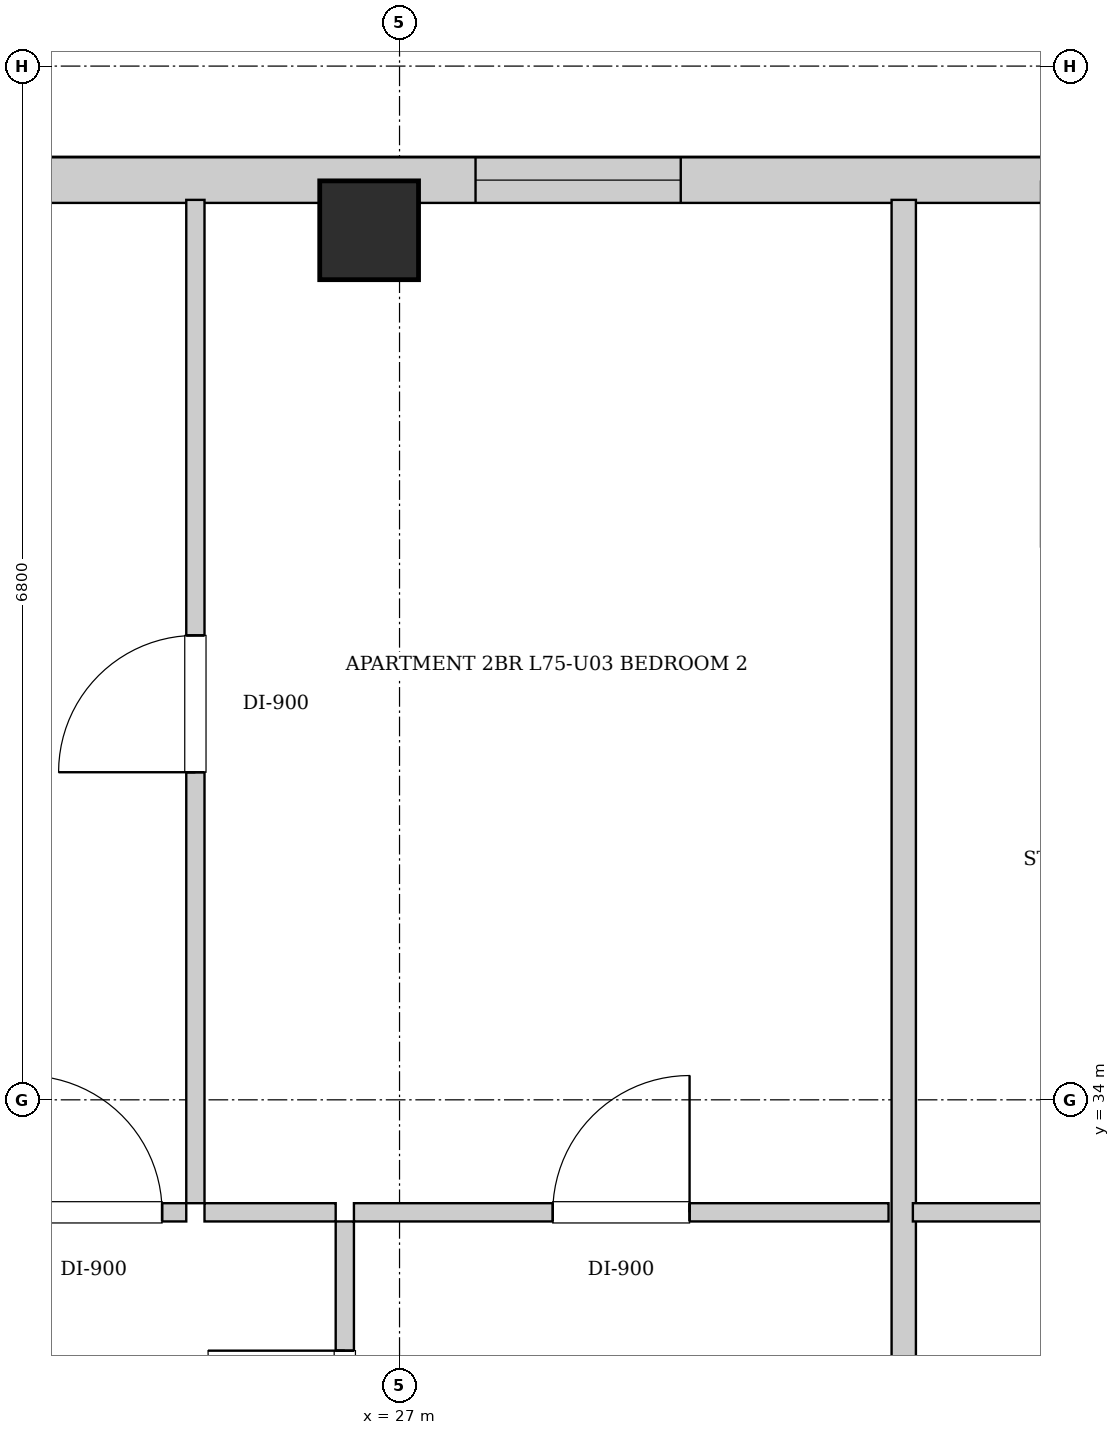
"""IFC4 building model, lengths in metres.
Left out: names, types, materials, properties, quantities, classifications, styles, units other than length and angle.
Written with IfcOpenShell. Run it as: python <this file> out.ifc"""

import sys

from ifc_helpers import new_model, si_unit, direction, frame, frame_2d, origin, origin_2d, place, context, subcontext, project, spatial, rectangle, extrude, element, fill, save


model = new_model("IFC4")
c1 = context("Model", 3, precision=1e-05, world=origin(), true_north=direction((0.0, 1.0)))
c2 = subcontext(c1, "Body", "Model", "MODEL_VIEW")
j1 = project(units=[si_unit("LENGTHUNIT", "METRE"), si_unit("PLANEANGLEUNIT", "RADIAN")], contexts=[c1])
p1 = place(None, origin())
s1 = spatial("IfcSite", under=j1, at=p1, CompositionType="ELEMENT")
p2 = place(p1, origin())
s2 = spatial("IfcBuilding", under=s1, at=p2, CompositionType="ELEMENT")
p3 = place(p2, frame((0.0, 0.0, 258.1)))
s3 = spatial("IfcBuildingStorey", under=s2, at=p3, CompositionType="ELEMENT", Elevation=258.1)
p4 = place(p3, frame((26.8, 39.72, 0.0), z_axis=(0.0, 0.0, 1.0), x_axis=(1.0, 0.0, 0.0)))
e1 = element("IfcColumn", 1, at=p4, inside=s3, PredefinedType="COLUMN", context=c2, shape_type="SweptSolid", body=[
    extrude(rectangle(XDim=0.65, YDim=0.65, at=origin_2d()), origin(), (0.0, 0.0, 1.0), 3.4),
])
p5 = place(p3, frame((13.1, 40.05, 0.0), z_axis=(0.0, 0.0, 1.0), x_axis=(1.0, 0.0, 0.0)))
e2 = element("IfcWall", 2, at=p5, inside=s3, PredefinedType="SOLIDWALL", context=c2, shape_type="SweptSolid", body=[
    extrude(rectangle(XDim=18.25, YDim=0.3, at=frame_2d((9.125, 0.0))), origin(), (0.0, 0.0, 1.0), 3.05),
])
p6 = place(p5, frame((1.813, 0.0, 0.55)))
e3 = element("IfcOpeningElement", 3, at=p6, cuts=e2, PredefinedType="OPENING", context=c2, shape_type="SweptSolid", body=[
    extrude(rectangle(XDim=1.35, YDim=1.2, at=frame_2d((0.675, 0.6))), frame((0.0, 0.16, 0.0), z_axis=(0.0, -1.0, 0.0), x_axis=(1.0, 0.0, 0.0)), (0.0, 0.0, 1.0), 0.32),
])
p7 = place(p5, frame((5.66, 0.0, 0.55)))
e4 = element("IfcOpeningElement", 4, at=p7, cuts=e2, PredefinedType="OPENING", context=c2, shape_type="SweptSolid", body=[
    extrude(rectangle(XDim=1.35, YDim=1.2, at=frame_2d((0.675, 0.6))), frame((0.0, 0.16, 0.0), z_axis=(0.0, -1.0, 0.0), x_axis=(1.0, 0.0, 0.0)), (0.0, 0.0, 1.0), 0.32),
])
p8 = place(p5, frame((8.55, 0.0, 0.55)))
e5 = element("IfcOpeningElement", 5, at=p8, cuts=e2, PredefinedType="OPENING", context=c2, shape_type="SweptSolid", body=[
    extrude(rectangle(XDim=0.85, YDim=1.2, at=frame_2d((0.425, 0.6))), frame((0.0, 0.16, 0.0), z_axis=(0.0, -1.0, 0.0), x_axis=(1.0, 0.0, 0.0)), (0.0, 0.0, 1.0), 0.32),
])
p9 = place(p5, frame((14.4, 0.0, 0.55)))
e6 = element("IfcOpeningElement", 6, at=p9, cuts=e2, PredefinedType="OPENING", context=c2, shape_type="SweptSolid", body=[
    extrude(rectangle(XDim=1.35, YDim=1.2, at=frame_2d((0.675, 0.6))), frame((0.0, 0.16, 0.0), z_axis=(0.0, -1.0, 0.0), x_axis=(1.0, 0.0, 0.0)), (0.0, 0.0, 1.0), 0.32),
])
p10 = place(p3, frame((26.64, 30.6, 0.0), z_axis=(0.0, 0.0, 1.0), x_axis=(0.0, 1.0, 0.0)))
e7 = element("IfcWall", 7, at=p10, inside=s3, PredefinedType="PARTITIONING", context=c2, shape_type="SweptSolid", body=[
    extrude(rectangle(XDim=2.6, YDim=0.12, at=frame_2d((1.3, 0.0))), origin(), (0.0, 0.0, 1.0), 3.05),
])
p11 = place(p10, frame((0.85, 0.0, 0.0)))
e8 = element("IfcOpeningElement", 8, at=p11, cuts=e7, PredefinedType="OPENING", context=c2, shape_type="SweptSolid", body=[
    extrude(rectangle(XDim=0.9, YDim=2.05, at=frame_2d((0.45, 1.025))), frame((0.0, 0.07, 0.0), z_axis=(0.0, -1.0, 0.0), x_axis=(1.0, 0.0, 0.0)), (0.0, 0.0, 1.0), 0.14),
])
p12 = place(p3, frame((24.38, 33.26, 0.0), z_axis=(0.0, 0.0, 1.0), x_axis=(1.0, 0.0, 0.0)))
e9 = element("IfcWall", 9, at=p12, inside=s3, PredefinedType="PARTITIONING", context=c2, shape_type="SweptSolid", body=[
    extrude(rectangle(XDim=1.217, YDim=0.12, at=frame_2d((0.608, 0.0))), origin(), (0.0, 0.0, 1.0), 3.05),
])
p13 = place(p12, frame((0.158, 0.0, 0.0)))
e10 = element("IfcOpeningElement", 10, at=p13, cuts=e9, PredefinedType="OPENING", context=c2, shape_type="SweptSolid", body=[
    extrude(rectangle(XDim=0.9, YDim=2.05, at=frame_2d((0.45, 1.025))), frame((0.0, 0.07, 0.0), z_axis=(0.0, -1.0, 0.0), x_axis=(1.0, 0.0, 0.0)), (0.0, 0.0, 1.0), 0.14),
])
p14 = place(p3, frame((25.717, 33.26, 0.0), z_axis=(0.0, 0.0, 1.0), x_axis=(1.0, 0.0, 0.0)))
e11 = element("IfcWall", 11, at=p14, inside=s3, PredefinedType="PARTITIONING", context=c2, shape_type="SweptSolid", body=[
    extrude(rectangle(XDim=0.863, YDim=0.12, at=frame_2d((0.432, 0.0))), origin(), (0.0, 0.0, 1.0), 3.05),
])
p15 = place(p3, frame((26.7, 33.26, 0.0), z_axis=(0.0, 0.0, 1.0), x_axis=(1.0, 0.0, 0.0)))
e12 = element("IfcWall", 12, at=p15, inside=s3, PredefinedType="PARTITIONING", context=c2, shape_type="SweptSolid", body=[
    extrude(rectangle(XDim=3.517, YDim=0.12, at=frame_2d((1.759, 0.0))), origin(), (0.0, 0.0, 1.0), 3.05),
])
p16 = place(p15, frame((1.308, 0.0, 0.0)))
e13 = element("IfcOpeningElement", 13, at=p16, cuts=e12, PredefinedType="OPENING", context=c2, shape_type="SweptSolid", body=[
    extrude(rectangle(XDim=0.9, YDim=2.05, at=frame_2d((0.45, 1.025))), frame((0.0, 0.07, 0.0), z_axis=(0.0, -1.0, 0.0), x_axis=(1.0, 0.0, 0.0)), (0.0, 0.0, 1.0), 0.14),
])
p17 = place(p3, frame((25.657, 33.32, 0.0), z_axis=(0.0, 0.0, 1.0), x_axis=(0.0, 1.0, 0.0)))
e14 = element("IfcWall", 14, at=p17, inside=s3, PredefinedType="PARTITIONING", context=c2, shape_type="SweptSolid", body=[
    extrude(rectangle(XDim=6.6, YDim=0.12, at=frame_2d((3.3, 0.0))), origin(), (0.0, 0.0, 1.0), 3.05),
])
p18 = place(p17, frame((2.835, 0.0, 0.0)))
e15 = element("IfcOpeningElement", 15, at=p18, cuts=e14, PredefinedType="OPENING", context=c2, shape_type="SweptSolid", body=[
    extrude(rectangle(XDim=0.9, YDim=2.05, at=frame_2d((0.45, 1.025))), frame((0.0, 0.07, 0.0), z_axis=(0.0, -1.0, 0.0), x_axis=(1.0, 0.0, 0.0)), (0.0, 0.0, 1.0), 0.14),
])
p19 = place(p3, frame((30.317, 30.6, 0.0), z_axis=(0.0, 0.0, 1.0), x_axis=(0.0, 1.0, 0.0)))
e16 = element("IfcWall", 16, at=p19, inside=s3, PredefinedType="PARTITIONING", context=c2, shape_type="SweptSolid", body=[
    extrude(rectangle(XDim=9.32, YDim=0.16, at=frame_2d((4.66, 0.0))), origin(), (0.0, 0.0, 1.0), 3.05),
])
p20 = place(p3, frame((30.377, 33.26, 0.0), z_axis=(0.0, 0.0, 1.0), x_axis=(1.0, 0.0, 0.0)))
e17 = element("IfcWall", 17, at=p20, inside=s3, PredefinedType="PARTITIONING", context=c2, shape_type="SweptSolid", body=[
    extrude(rectangle(XDim=2.203, YDim=0.12, at=frame_2d((1.102, 0.0))), origin(), (0.0, 0.0, 1.0), 3.05),
])
p21 = place(p11, origin())
e18 = element("IfcDoor", 18, at=p21, inside=s3, OperationType="SINGLE_SWING_RIGHT", PredefinedType="DOOR", context=c2, shape_type="SweptSolid", body=[
    extrude(rectangle(XDim=0.9, YDim=2.05, at=frame_2d((0.45, 1.025))), frame((0.0, 0.025, 0.0), z_axis=(0.0, -1.0, 0.0), x_axis=(1.0, 0.0, 0.0)), (0.0, 0.0, 1.0), 0.05),
])
fill(e8, e18)
p22 = place(p13, origin())
e19 = element("IfcDoor", 19, at=p22, inside=s3, OperationType="SINGLE_SWING_LEFT", PredefinedType="DOOR", context=c2, shape_type="SweptSolid", body=[
    extrude(rectangle(XDim=0.9, YDim=2.05, at=frame_2d((0.45, 1.025))), frame((0.0, 0.025, 0.0), z_axis=(0.0, -1.0, 0.0), x_axis=(1.0, 0.0, 0.0)), (0.0, 0.0, 1.0), 0.05),
])
fill(e10, e19)
p23 = place(p16, origin())
e20 = element("IfcDoor", 20, at=p23, inside=s3, OperationType="SINGLE_SWING_RIGHT", PredefinedType="DOOR", context=c2, shape_type="SweptSolid", body=[
    extrude(rectangle(XDim=0.9, YDim=2.05, at=frame_2d((0.45, 1.025))), frame((0.0, 0.025, 0.0), z_axis=(0.0, -1.0, 0.0), x_axis=(1.0, 0.0, 0.0)), (0.0, 0.0, 1.0), 0.05),
])
fill(e13, e20)
p24 = place(p18, origin())
e21 = element("IfcDoor", 21, at=p24, inside=s3, OperationType="SINGLE_SWING_LEFT", PredefinedType="DOOR", context=c2, shape_type="SweptSolid", body=[
    extrude(rectangle(XDim=0.9, YDim=2.05, at=frame_2d((0.45, 1.025))), frame((0.0, 0.025, 0.0), z_axis=(0.0, -1.0, 0.0), x_axis=(1.0, 0.0, 0.0)), (0.0, 0.0, 1.0), 0.05),
])
fill(e15, e21)
p25 = place(p9, origin())
e22 = element("IfcWindow", 22, at=p25, inside=s3, PartitioningType="SINGLE_PANEL", PredefinedType="WINDOW", context=c2, shape_type="SweptSolid", body=[
    extrude(rectangle(XDim=1.35, YDim=1.2, at=frame_2d((0.675, 0.6))), frame((0.0, 0.03, 0.0), z_axis=(0.0, -1.0, 0.0), x_axis=(1.0, 0.0, 0.0)), (0.0, 0.0, 1.0), 0.06),
])
fill(e6, e22)
save(model, sys.argv[1])
